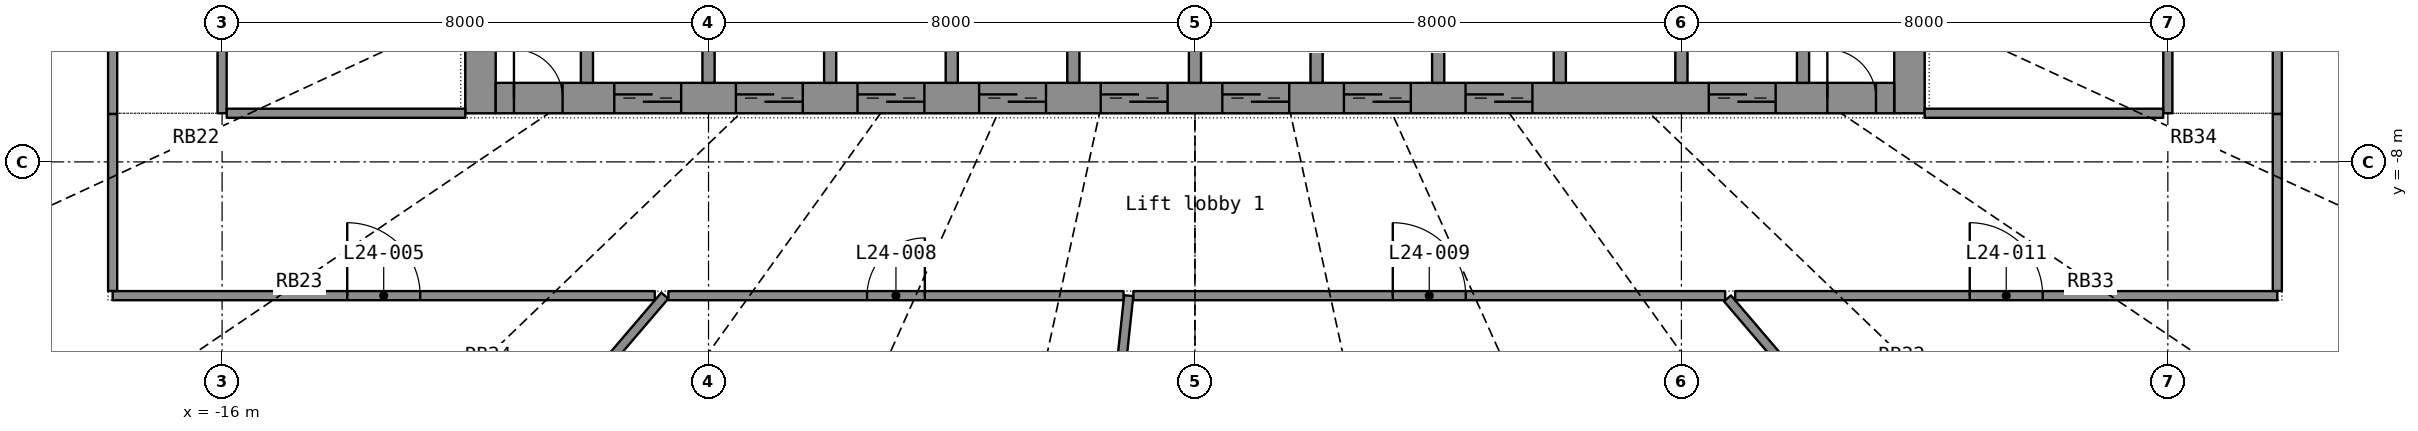
"""IFC4 building model, lengths in metres.
Left out: names, types, materials, properties, quantities, classifications, styles, units other than length and angle.
Written with IfcOpenShell. Run it as: python <this file> out.ifc"""

import sys

from ifc_helpers import new_model, si_unit, direction, frame, frame_2d, origin, place, context, subcontext, project, spatial, rectangle, extrude, element, fill, save


model = new_model("IFC4")
c1 = context("Model", 3, precision=1e-05, world=origin(), true_north=direction((0.0, 1.0)))
c2 = subcontext(c1, "Body", "Model", "MODEL_VIEW")
j1 = project(units=[si_unit("LENGTHUNIT", "METRE"), si_unit("PLANEANGLEUNIT", "RADIAN")], contexts=[c1])
p1 = place(None, origin())
s1 = spatial("IfcSite", under=j1, at=p1, CompositionType="ELEMENT")
p2 = place(p1, origin())
s2 = spatial("IfcBuilding", under=s1, at=p2, CompositionType="ELEMENT")
p3 = place(p2, frame((0.0, 0.0, 104.5)))
s3 = spatial("IfcBuildingStorey", under=s2, at=p3, CompositionType="ELEMENT", Elevation=104.5)
p4 = place(p3, frame((-11.75, -7.2, 0.0), z_axis=(0.0, 0.0, 1.0), x_axis=(0.0, 1.0, 0.0)))
e1 = element("IfcWall", 1, at=p4, inside=s3, PredefinedType="SHEAR", context=c2, shape_type="SweptSolid", body=[
    extrude(rectangle(XDim=14.4, YDim=0.5, at=frame_2d((7.2, 0.0))), origin(), (0.0, 0.0, 1.0), 3.3),
])
p5 = place(p4, frame((6.5, 0.0, 0.0)))
e2 = element("IfcOpeningElement", 2, at=p5, cuts=e1, PredefinedType="OPENING", context=c2, shape_type="SweptSolid", body=[
    extrude(rectangle(XDim=1.4, YDim=2.2, at=frame_2d((0.7, 1.1))), frame((0.0, 0.26, 0.0), z_axis=(0.0, -1.0, 0.0), x_axis=(1.0, 0.0, 0.0)), (0.0, 0.0, 1.0), 0.52),
])
p6 = place(p3, frame((11.75, -7.2, 0.0), z_axis=(0.0, 0.0, 1.0), x_axis=(0.0, 1.0, 0.0)))
e3 = element("IfcWall", 3, at=p6, inside=s3, PredefinedType="SHEAR", context=c2, shape_type="SweptSolid", body=[
    extrude(rectangle(XDim=14.4, YDim=0.5, at=frame_2d((7.2, 0.0))), origin(), (0.0, 0.0, 1.0), 3.3),
])
p7 = place(p6, frame((6.5, 0.0, 0.0)))
e4 = element("IfcOpeningElement", 4, at=p7, cuts=e3, PredefinedType="OPENING", context=c2, shape_type="SweptSolid", body=[
    extrude(rectangle(XDim=1.4, YDim=2.2, at=frame_2d((0.7, 1.1))), frame((0.0, 0.26, 0.0), z_axis=(0.0, -1.0, 0.0), x_axis=(1.0, 0.0, 0.0)), (0.0, 0.0, 1.0), 0.52),
])
p8 = place(p3, frame((-11.5, -6.95, 0.0), z_axis=(0.0, 0.0, 1.0), x_axis=(1.0, 0.0, 0.0)))
e5 = element("IfcWall", 5, at=p8, inside=s3, PredefinedType="SHEAR", context=c2, shape_type="SweptSolid", body=[
    extrude(rectangle(XDim=23.0, YDim=0.5, at=frame_2d((11.5, 0.0))), origin(), (0.0, 0.0, 1.0), 3.3),
])
p9 = place(p8, frame((1.95, 0.0, 0.0)))
e6 = element("IfcOpeningElement", 6, at=p9, cuts=e5, PredefinedType="OPENING", context=c2, shape_type="SweptSolid", body=[
    extrude(rectangle(XDim=1.1, YDim=2.2, at=frame_2d((0.55, 1.1))), frame((0.0, 0.26, 0.0), z_axis=(0.0, -1.0, 0.0), x_axis=(1.0, 0.0, 0.0)), (0.0, 0.0, 1.0), 0.52),
])
p10 = place(p8, frame((3.95, 0.0, 0.0)))
e7 = element("IfcOpeningElement", 7, at=p10, cuts=e5, PredefinedType="OPENING", context=c2, shape_type="SweptSolid", body=[
    extrude(rectangle(XDim=1.1, YDim=2.2, at=frame_2d((0.55, 1.1))), frame((0.0, 0.26, 0.0), z_axis=(0.0, -1.0, 0.0), x_axis=(1.0, 0.0, 0.0)), (0.0, 0.0, 1.0), 0.52),
])
p11 = place(p8, frame((5.95, 0.0, 0.0)))
e8 = element("IfcOpeningElement", 8, at=p11, cuts=e5, PredefinedType="OPENING", context=c2, shape_type="SweptSolid", body=[
    extrude(rectangle(XDim=1.1, YDim=2.2, at=frame_2d((0.55, 1.1))), frame((0.0, 0.26, 0.0), z_axis=(0.0, -1.0, 0.0), x_axis=(1.0, 0.0, 0.0)), (0.0, 0.0, 1.0), 0.52),
])
p12 = place(p8, frame((7.95, 0.0, 0.0)))
e9 = element("IfcOpeningElement", 9, at=p12, cuts=e5, PredefinedType="OPENING", context=c2, shape_type="SweptSolid", body=[
    extrude(rectangle(XDim=1.1, YDim=2.2, at=frame_2d((0.55, 1.1))), frame((0.0, 0.26, 0.0), z_axis=(0.0, -1.0, 0.0), x_axis=(1.0, 0.0, 0.0)), (0.0, 0.0, 1.0), 0.52),
])
p13 = place(p8, frame((9.95, 0.0, 0.0)))
e10 = element("IfcOpeningElement", 10, at=p13, cuts=e5, PredefinedType="OPENING", context=c2, shape_type="SweptSolid", body=[
    extrude(rectangle(XDim=1.1, YDim=2.2, at=frame_2d((0.55, 1.1))), frame((0.0, 0.26, 0.0), z_axis=(0.0, -1.0, 0.0), x_axis=(1.0, 0.0, 0.0)), (0.0, 0.0, 1.0), 0.52),
])
p14 = place(p8, frame((11.95, 0.0, 0.0)))
e11 = element("IfcOpeningElement", 11, at=p14, cuts=e5, PredefinedType="OPENING", context=c2, shape_type="SweptSolid", body=[
    extrude(rectangle(XDim=1.1, YDim=2.2, at=frame_2d((0.55, 1.1))), frame((0.0, 0.26, 0.0), z_axis=(0.0, -1.0, 0.0), x_axis=(1.0, 0.0, 0.0)), (0.0, 0.0, 1.0), 0.52),
])
p15 = place(p8, frame((13.95, 0.0, 0.0)))
e12 = element("IfcOpeningElement", 12, at=p15, cuts=e5, PredefinedType="OPENING", context=c2, shape_type="SweptSolid", body=[
    extrude(rectangle(XDim=1.1, YDim=2.2, at=frame_2d((0.55, 1.1))), frame((0.0, 0.26, 0.0), z_axis=(0.0, -1.0, 0.0), x_axis=(1.0, 0.0, 0.0)), (0.0, 0.0, 1.0), 0.52),
])
p16 = place(p8, frame((15.95, 0.0, 0.0)))
e13 = element("IfcOpeningElement", 13, at=p16, cuts=e5, PredefinedType="OPENING", context=c2, shape_type="SweptSolid", body=[
    extrude(rectangle(XDim=1.1, YDim=2.2, at=frame_2d((0.55, 1.1))), frame((0.0, 0.26, 0.0), z_axis=(0.0, -1.0, 0.0), x_axis=(1.0, 0.0, 0.0)), (0.0, 0.0, 1.0), 0.52),
])
p17 = place(p8, frame((19.95, 0.0, 0.0)))
e14 = element("IfcOpeningElement", 14, at=p17, cuts=e5, PredefinedType="OPENING", context=c2, shape_type="SweptSolid", body=[
    extrude(rectangle(XDim=1.1, YDim=2.2, at=frame_2d((0.55, 1.1))), frame((0.0, 0.26, 0.0), z_axis=(0.0, -1.0, 0.0), x_axis=(1.0, 0.0, 0.0)), (0.0, 0.0, 1.0), 0.52),
])
p18 = place(p8, frame((0.3, 0.0, 0.0)))
e15 = element("IfcOpeningElement", 15, at=p18, cuts=e5, PredefinedType="OPENING", context=c2, shape_type="SweptSolid", body=[
    extrude(rectangle(XDim=0.8, YDim=2.05, at=frame_2d((0.4, 1.025))), frame((0.0, 0.26, 0.0), z_axis=(0.0, -1.0, 0.0), x_axis=(1.0, 0.0, 0.0)), (0.0, 0.0, 1.0), 0.52),
])
p19 = place(p8, frame((21.9, 0.0, 0.0)))
e16 = element("IfcOpeningElement", 16, at=p19, cuts=e5, PredefinedType="OPENING", context=c2, shape_type="SweptSolid", body=[
    extrude(rectangle(XDim=0.8, YDim=2.05, at=frame_2d((0.4, 1.025))), frame((0.0, 0.26, 0.0), z_axis=(0.0, -1.0, 0.0), x_axis=(1.0, 0.0, 0.0)), (0.0, 0.0, 1.0), 0.52),
])
for number, where, z_axis, x_axis in (
    (17, (-10.0, -6.7, 0.0), (0.0, 0.0, 1.0), (0.0, 1.0, 0.0)),
    (18, (-8.0, -6.7, 0.0), (0.0, 0.0, 1.0), (0.0, 1.0, 0.0)),
    (19, (-6.0, -6.7, 0.0), (0.0, 0.0, 1.0), (0.0, 1.0, 0.0)),
    (20, (-4.0, -6.7, 0.0), (0.0, 0.0, 1.0), (0.0, 1.0, 0.0)),
    (21, (-2.0, -6.7, 0.0), (0.0, 0.0, 1.0), (0.0, 1.0, 0.0)),
    (22, (0.0, -6.7, 0.0), (0.0, 0.0, 1.0), (0.0, 1.0, 0.0)),
    (23, (2.0, -6.7, 0.0), (0.0, 0.0, 1.0), (0.0, 1.0, 0.0)),
    (24, (4.0, -6.7, 0.0), (0.0, 0.0, 1.0), (0.0, 1.0, 0.0)),
    (25, (6.0, -6.7, 0.0), (0.0, 0.0, 1.0), (0.0, 1.0, 0.0)),
    (26, (8.0, -6.7, 0.0), (0.0, 0.0, 1.0), (0.0, 1.0, 0.0)),
    (27, (10.0, -6.7, 0.0), (0.0, 0.0, 1.0), (0.0, 1.0, 0.0)),
):
    element("IfcWall", number, at=place(p3, frame(where, z_axis=z_axis, x_axis=x_axis)), inside=s3, PredefinedType="SHEAR", context=c2, shape_type="SweptSolid", body=[
        extrude(rectangle(XDim=2.8, YDim=0.2, at=frame_2d((1.4, 0.0))), origin(), (0.0, 0.0, 1.0), 3.3),
    ])
p20 = place(p3, frame((-2.252, -21.088, 0.0), z_axis=(0.0, 0.0, 1.0), x_axis=(0.106196959, 0.994345114, 0.0)))
e28 = element("IfcWall", 28, at=p20, inside=s3, PredefinedType="PARTITIONING", context=c2, shape_type="SweptSolid", body=[
    extrude(rectangle(XDim=10.95, YDim=0.15, at=frame_2d((5.475, 0.0))), origin(), (0.0, 0.0, 1.0), 2.4),
])
p21 = place(p3, frame((-1.013, -10.2, 0.0), z_axis=(0.0, 0.0, 1.0), x_axis=(1.0, 0.0, 0.0)))
e29 = element("IfcWall", 29, at=p21, inside=s3, PredefinedType="PARTITIONING", context=c2, shape_type="SweptSolid", body=[
    extrude(rectangle(XDim=9.732, YDim=0.15, at=frame_2d((4.866, 0.0))), origin(), (0.0, 0.0, 1.0), 2.4),
])
p22 = place(p21, frame((4.266, 0.0, 0.0)))
e30 = element("IfcOpeningElement", 30, at=p22, cuts=e29, PredefinedType="OPENING", context=c2, shape_type="SweptSolid", body=[
    extrude(rectangle(XDim=1.2, YDim=2.2, at=frame_2d((0.6, 1.1))), frame((0.0, 0.085, 0.0), z_axis=(0.0, -1.0, 0.0), x_axis=(1.0, 0.0, 0.0)), (0.0, 0.0, 1.0), 0.17),
])
p23 = place(p3, frame((14.828, -17.346, 0.0), z_axis=(0.0, 0.0, 1.0), x_axis=(-0.649770677, 0.760130296, 0.0)))
e31 = element("IfcWall", 31, at=p23, inside=s3, PredefinedType="PARTITIONING", context=c2, shape_type="SweptSolid", body=[
    extrude(rectangle(XDim=9.342, YDim=0.15, at=frame_2d((4.671, 0.0))), origin(), (0.0, 0.0, 1.0), 2.4),
])
p24 = place(p3, frame((-14.827, -17.345, 0.0), z_axis=(0.0, 0.0, 1.0), x_axis=(0.649770499, 0.760130448, 0.0)))
e32 = element("IfcWall", 32, at=p24, inside=s3, PredefinedType="PARTITIONING", context=c2, shape_type="SweptSolid", body=[
    extrude(rectangle(XDim=9.4, YDim=0.15, at=frame_2d((4.7, 0.0))), origin(), (0.0, 0.0, 1.0), 2.4),
])
p25 = place(p3, frame((-17.8, -10.2, 0.0), z_axis=(0.0, 0.0, 1.0), x_axis=(1.0, 0.0, 0.0)))
e33 = element("IfcWall", 33, at=p25, inside=s3, PredefinedType="PARTITIONING", context=c2, shape_type="SweptSolid", body=[
    extrude(rectangle(XDim=8.916, YDim=0.15, at=frame_2d((4.458, 0.0))), origin(), (0.0, 0.0, 1.0), 2.4),
])
p26 = place(p25, frame((3.858, 0.0, 0.0)))
e34 = element("IfcOpeningElement", 34, at=p26, cuts=e33, PredefinedType="OPENING", context=c2, shape_type="SweptSolid", body=[
    extrude(rectangle(XDim=1.2, YDim=2.2, at=frame_2d((0.6, 1.1))), frame((0.0, 0.085, 0.0), z_axis=(0.0, -1.0, 0.0), x_axis=(1.0, 0.0, 0.0)), (0.0, 0.0, 1.0), 0.17),
])
p27 = place(p3, frame((8.884, -10.2, 0.0), z_axis=(0.0, 0.0, 1.0), x_axis=(1.0, 0.0, 0.0)))
e35 = element("IfcWall", 35, at=p27, inside=s3, PredefinedType="PARTITIONING", context=c2, shape_type="SweptSolid", body=[
    extrude(rectangle(XDim=8.916, YDim=0.15, at=frame_2d((4.458, 0.0))), origin(), (0.0, 0.0, 1.0), 2.4),
])
p28 = place(p27, frame((3.858, 0.0, 0.0)))
e36 = element("IfcOpeningElement", 36, at=p28, cuts=e35, PredefinedType="OPENING", context=c2, shape_type="SweptSolid", body=[
    extrude(rectangle(XDim=1.2, YDim=2.2, at=frame_2d((0.6, 1.1))), frame((0.0, 0.085, 0.0), z_axis=(0.0, -1.0, 0.0), x_axis=(1.0, 0.0, 0.0)), (0.0, 0.0, 1.0), 0.17),
])
p29 = place(p3, frame((-8.66, -10.2, 0.0), z_axis=(0.0, 0.0, 1.0), x_axis=(1.0, 0.0, 0.0)))
e37 = element("IfcWall", 37, at=p29, inside=s3, PredefinedType="PARTITIONING", context=c2, shape_type="SweptSolid", body=[
    extrude(rectangle(XDim=7.486, YDim=0.15, at=frame_2d((3.743, 0.0))), origin(), (0.0, 0.0, 1.0), 2.4),
])
p30 = place(p29, frame((3.268, 0.0, 0.0)))
e38 = element("IfcOpeningElement", 38, at=p30, cuts=e37, PredefinedType="OPENING", context=c2, shape_type="SweptSolid", body=[
    extrude(rectangle(XDim=0.95, YDim=2.15, at=frame_2d((0.475, 1.075))), frame((0.0, 0.085, 0.0), z_axis=(0.0, -1.0, 0.0), x_axis=(1.0, 0.0, 0.0)), (0.0, 0.0, 1.0), 0.17),
])
p31 = place(p3, frame((-16.0, -7.2, 0.0), z_axis=(0.0, 0.0, 1.0), x_axis=(0.0, 1.0, 0.0)))
e39 = element("IfcWall", 39, at=p31, inside=s3, PredefinedType="PARTITIONING", context=c2, shape_type="SweptSolid", body=[
    extrude(rectangle(XDim=6.053, YDim=0.15, at=frame_2d((3.027, 0.0))), origin(), (0.0, 0.0, 1.0), 2.4),
])
p32 = place(p31, frame((2.427, 0.0, 0.0)))
e40 = element("IfcOpeningElement", 40, at=p32, cuts=e39, PredefinedType="OPENING", context=c2, shape_type="SweptSolid", body=[
    extrude(rectangle(XDim=1.2, YDim=2.2, at=frame_2d((0.6, 1.1))), frame((0.0, 0.085, 0.0), z_axis=(0.0, -1.0, 0.0), x_axis=(1.0, 0.0, 0.0)), (0.0, 0.0, 1.0), 0.17),
])
p33 = place(p3, frame((16.0, -1.146, 0.0), z_axis=(0.0, 0.0, 1.0), x_axis=(0.0, -1.0, 0.0)))
e41 = element("IfcWall", 41, at=p33, inside=s3, PredefinedType="PARTITIONING", context=c2, shape_type="SweptSolid", body=[
    extrude(rectangle(XDim=6.053, YDim=0.15, at=frame_2d((3.027, 0.0))), origin(), (0.0, 0.0, 1.0), 2.4),
])
p34 = place(p33, frame((2.427, 0.0, 0.0)))
e42 = element("IfcOpeningElement", 42, at=p34, cuts=e41, PredefinedType="OPENING", context=c2, shape_type="SweptSolid", body=[
    extrude(rectangle(XDim=1.2, YDim=2.2, at=frame_2d((0.6, 1.1))), frame((0.0, 0.085, 0.0), z_axis=(0.0, -1.0, 0.0), x_axis=(1.0, 0.0, 0.0)), (0.0, 0.0, 1.0), 0.17),
])
p35 = place(p3, frame((-17.8, -1.276, 0.0), z_axis=(0.0, 0.0, 1.0), x_axis=(0.0, -1.0, 0.0)))
e43 = element("IfcWall", 43, at=p35, inside=s3, PredefinedType="PARTITIONING", context=c2, shape_type="SweptSolid", body=[
    extrude(rectangle(XDim=5.936, YDim=0.15, at=frame_2d((2.968, 0.0))), origin(), (0.0, 0.0, 1.0), 2.4),
])
p36 = place(p35, frame((2.368, 0.0, 0.0)))
e44 = element("IfcOpeningElement", 44, at=p36, cuts=e43, PredefinedType="OPENING", context=c2, shape_type="SweptSolid", body=[
    extrude(rectangle(XDim=1.2, YDim=2.2, at=frame_2d((0.6, 1.1))), frame((0.0, 0.085, 0.0), z_axis=(0.0, -1.0, 0.0), x_axis=(1.0, 0.0, 0.0)), (0.0, 0.0, 1.0), 0.17),
])
p37 = place(p3, frame((17.8, -7.212, 0.0), z_axis=(0.0, 0.0, 1.0), x_axis=(0.0, 1.0, 0.0)))
e45 = element("IfcWall", 45, at=p37, inside=s3, PredefinedType="PARTITIONING", context=c2, shape_type="SweptSolid", body=[
    extrude(rectangle(XDim=5.789, YDim=0.15, at=frame_2d((2.894, 0.0))), origin(), (0.0, 0.0, 1.0), 2.4),
])
p38 = place(p37, frame((2.294, 0.0, 0.0)))
e46 = element("IfcOpeningElement", 46, at=p38, cuts=e45, PredefinedType="OPENING", context=c2, shape_type="SweptSolid", body=[
    extrude(rectangle(XDim=1.2, YDim=2.2, at=frame_2d((0.6, 1.1))), frame((0.0, 0.085, 0.0), z_axis=(0.0, -1.0, 0.0), x_axis=(1.0, 0.0, 0.0)), (0.0, 0.0, 1.0), 0.17),
])
for number, where, z_axis, x_axis in (
    (47, (-12.0, -7.2, 0.0), (0.0, 0.0, 1.0), (-1.0, 0.0, 0.0)),
    (48, (15.923, -7.2, 0.0), (0.0, 0.0, 1.0), (-1.0, 0.0, 0.0)),
):
    element("IfcWall", number, at=place(p3, frame(where, z_axis=z_axis, x_axis=x_axis)), inside=s3, PredefinedType="PARTITIONING", context=c2, shape_type="SweptSolid", body=[
        extrude(rectangle(XDim=3.923, YDim=0.15, at=frame_2d((1.961, 0.0))), origin(), (0.0, 0.0, 1.0), 2.4),
    ])
for number, where, z_axis, x_axis in (
    (49, (-17.8, -7.213, 0.0), (0.0, 0.0, 1.0), (0.0, -1.0, 0.0)),
    (50, (17.8, -10.123, 0.0), (0.0, 0.0, 1.0), (0.0, 1.0, 0.0)),
):
    element("IfcWall", number, at=place(p3, frame(where, z_axis=z_axis, x_axis=x_axis)), inside=s3, PredefinedType="PARTITIONING", context=c2, shape_type="SweptSolid", body=[
        extrude(rectangle(XDim=2.91, YDim=0.15, at=frame_2d((1.455, 0.0))), origin(), (0.0, 0.0, 1.0), 2.4),
    ])
p39 = place(p9, origin())
e51 = element("IfcDoor", 51, at=p39, inside=s3, OperationType="DOUBLE_DOOR_SLIDING", PredefinedType="DOOR", context=c2, shape_type="SweptSolid", body=[
    extrude(rectangle(XDim=1.1, YDim=2.2, at=frame_2d((0.55, 1.1))), frame((0.0, 0.025, 0.0), z_axis=(0.0, -1.0, 0.0), x_axis=(1.0, 0.0, 0.0)), (0.0, 0.0, 1.0), 0.05),
])
fill(e6, e51)
p40 = place(p10, origin())
e52 = element("IfcDoor", 52, at=p40, inside=s3, OperationType="DOUBLE_DOOR_SLIDING", PredefinedType="DOOR", context=c2, shape_type="SweptSolid", body=[
    extrude(rectangle(XDim=1.1, YDim=2.2, at=frame_2d((0.55, 1.1))), frame((0.0, 0.025, 0.0), z_axis=(0.0, -1.0, 0.0), x_axis=(1.0, 0.0, 0.0)), (0.0, 0.0, 1.0), 0.05),
])
fill(e7, e52)
p41 = place(p11, origin())
e53 = element("IfcDoor", 53, at=p41, inside=s3, OperationType="DOUBLE_DOOR_SLIDING", PredefinedType="DOOR", context=c2, shape_type="SweptSolid", body=[
    extrude(rectangle(XDim=1.1, YDim=2.2, at=frame_2d((0.55, 1.1))), frame((0.0, 0.025, 0.0), z_axis=(0.0, -1.0, 0.0), x_axis=(1.0, 0.0, 0.0)), (0.0, 0.0, 1.0), 0.05),
])
fill(e8, e53)
p42 = place(p12, origin())
e54 = element("IfcDoor", 54, at=p42, inside=s3, OperationType="DOUBLE_DOOR_SLIDING", PredefinedType="DOOR", context=c2, shape_type="SweptSolid", body=[
    extrude(rectangle(XDim=1.1, YDim=2.2, at=frame_2d((0.55, 1.1))), frame((0.0, 0.025, 0.0), z_axis=(0.0, -1.0, 0.0), x_axis=(1.0, 0.0, 0.0)), (0.0, 0.0, 1.0), 0.05),
])
fill(e9, e54)
p43 = place(p13, origin())
e55 = element("IfcDoor", 55, at=p43, inside=s3, OperationType="DOUBLE_DOOR_SLIDING", PredefinedType="DOOR", context=c2, shape_type="SweptSolid", body=[
    extrude(rectangle(XDim=1.1, YDim=2.2, at=frame_2d((0.55, 1.1))), frame((0.0, 0.025, 0.0), z_axis=(0.0, -1.0, 0.0), x_axis=(1.0, 0.0, 0.0)), (0.0, 0.0, 1.0), 0.05),
])
fill(e10, e55)
p44 = place(p14, origin())
e56 = element("IfcDoor", 56, at=p44, inside=s3, OperationType="DOUBLE_DOOR_SLIDING", PredefinedType="DOOR", context=c2, shape_type="SweptSolid", body=[
    extrude(rectangle(XDim=1.1, YDim=2.2, at=frame_2d((0.55, 1.1))), frame((0.0, 0.025, 0.0), z_axis=(0.0, -1.0, 0.0), x_axis=(1.0, 0.0, 0.0)), (0.0, 0.0, 1.0), 0.05),
])
fill(e11, e56)
p45 = place(p15, origin())
e57 = element("IfcDoor", 57, at=p45, inside=s3, OperationType="DOUBLE_DOOR_SLIDING", PredefinedType="DOOR", context=c2, shape_type="SweptSolid", body=[
    extrude(rectangle(XDim=1.1, YDim=2.2, at=frame_2d((0.55, 1.1))), frame((0.0, 0.025, 0.0), z_axis=(0.0, -1.0, 0.0), x_axis=(1.0, 0.0, 0.0)), (0.0, 0.0, 1.0), 0.05),
])
fill(e12, e57)
p46 = place(p16, origin())
e58 = element("IfcDoor", 58, at=p46, inside=s3, OperationType="DOUBLE_DOOR_SLIDING", PredefinedType="DOOR", context=c2, shape_type="SweptSolid", body=[
    extrude(rectangle(XDim=1.1, YDim=2.2, at=frame_2d((0.55, 1.1))), frame((0.0, 0.025, 0.0), z_axis=(0.0, -1.0, 0.0), x_axis=(1.0, 0.0, 0.0)), (0.0, 0.0, 1.0), 0.05),
])
fill(e13, e58)
p47 = place(p17, origin())
e59 = element("IfcDoor", 59, at=p47, inside=s3, OperationType="DOUBLE_DOOR_SLIDING", PredefinedType="DOOR", context=c2, shape_type="SweptSolid", body=[
    extrude(rectangle(XDim=1.1, YDim=2.2, at=frame_2d((0.55, 1.1))), frame((0.0, 0.025, 0.0), z_axis=(0.0, -1.0, 0.0), x_axis=(1.0, 0.0, 0.0)), (0.0, 0.0, 1.0), 0.05),
])
fill(e14, e59)
p48 = place(p18, origin())
e60 = element("IfcDoor", 60, at=p48, inside=s3, OperationType="SINGLE_SWING_LEFT", PredefinedType="DOOR", context=c2, shape_type="SweptSolid", body=[
    extrude(rectangle(XDim=0.8, YDim=2.05, at=frame_2d((0.4, 1.025))), frame((0.0, 0.025, 0.0), z_axis=(0.0, -1.0, 0.0), x_axis=(1.0, 0.0, 0.0)), (0.0, 0.0, 1.0), 0.05),
])
fill(e15, e60)
p49 = place(p19, origin())
e61 = element("IfcDoor", 61, at=p49, inside=s3, OperationType="SINGLE_SWING_LEFT", PredefinedType="DOOR", context=c2, shape_type="SweptSolid", body=[
    extrude(rectangle(XDim=0.8, YDim=2.05, at=frame_2d((0.4, 1.025))), frame((0.0, 0.025, 0.0), z_axis=(0.0, -1.0, 0.0), x_axis=(1.0, 0.0, 0.0)), (0.0, 0.0, 1.0), 0.05),
])
fill(e16, e61)
p50 = place(p26, origin())
e62 = element("IfcDoor", 62, at=p50, inside=s3, OperationType="DOUBLE_DOOR_SINGLE_SWING", PredefinedType="DOOR", context=c2, shape_type="SweptSolid", body=[
    extrude(rectangle(XDim=1.2, YDim=2.2, at=frame_2d((0.6, 1.1))), frame((0.0, 0.025, 0.0), z_axis=(0.0, -1.0, 0.0), x_axis=(1.0, 0.0, 0.0)), (0.0, 0.0, 1.0), 0.05),
])
fill(e34, e62)
p51 = place(p30, origin())
e63 = element("IfcDoor", 63, at=p51, inside=s3, OperationType="SINGLE_SWING_RIGHT", PredefinedType="DOOR", context=c2, shape_type="SweptSolid", body=[
    extrude(rectangle(XDim=0.95, YDim=2.15, at=frame_2d((0.475, 1.075))), frame((0.0, 0.025, 0.0), z_axis=(0.0, -1.0, 0.0), x_axis=(1.0, 0.0, 0.0)), (0.0, 0.0, 1.0), 0.05),
])
fill(e38, e63)
p52 = place(p22, origin())
e64 = element("IfcDoor", 64, at=p52, inside=s3, OperationType="DOUBLE_DOOR_SINGLE_SWING", PredefinedType="DOOR", context=c2, shape_type="SweptSolid", body=[
    extrude(rectangle(XDim=1.2, YDim=2.2, at=frame_2d((0.6, 1.1))), frame((0.0, 0.025, 0.0), z_axis=(0.0, -1.0, 0.0), x_axis=(1.0, 0.0, 0.0)), (0.0, 0.0, 1.0), 0.05),
])
fill(e30, e64)
p53 = place(p28, origin())
e65 = element("IfcDoor", 65, at=p53, inside=s3, OperationType="DOUBLE_DOOR_SINGLE_SWING", PredefinedType="DOOR", context=c2, shape_type="SweptSolid", body=[
    extrude(rectangle(XDim=1.2, YDim=2.2, at=frame_2d((0.6, 1.1))), frame((0.0, 0.025, 0.0), z_axis=(0.0, -1.0, 0.0), x_axis=(1.0, 0.0, 0.0)), (0.0, 0.0, 1.0), 0.05),
])
fill(e36, e65)
save(model, sys.argv[1])
